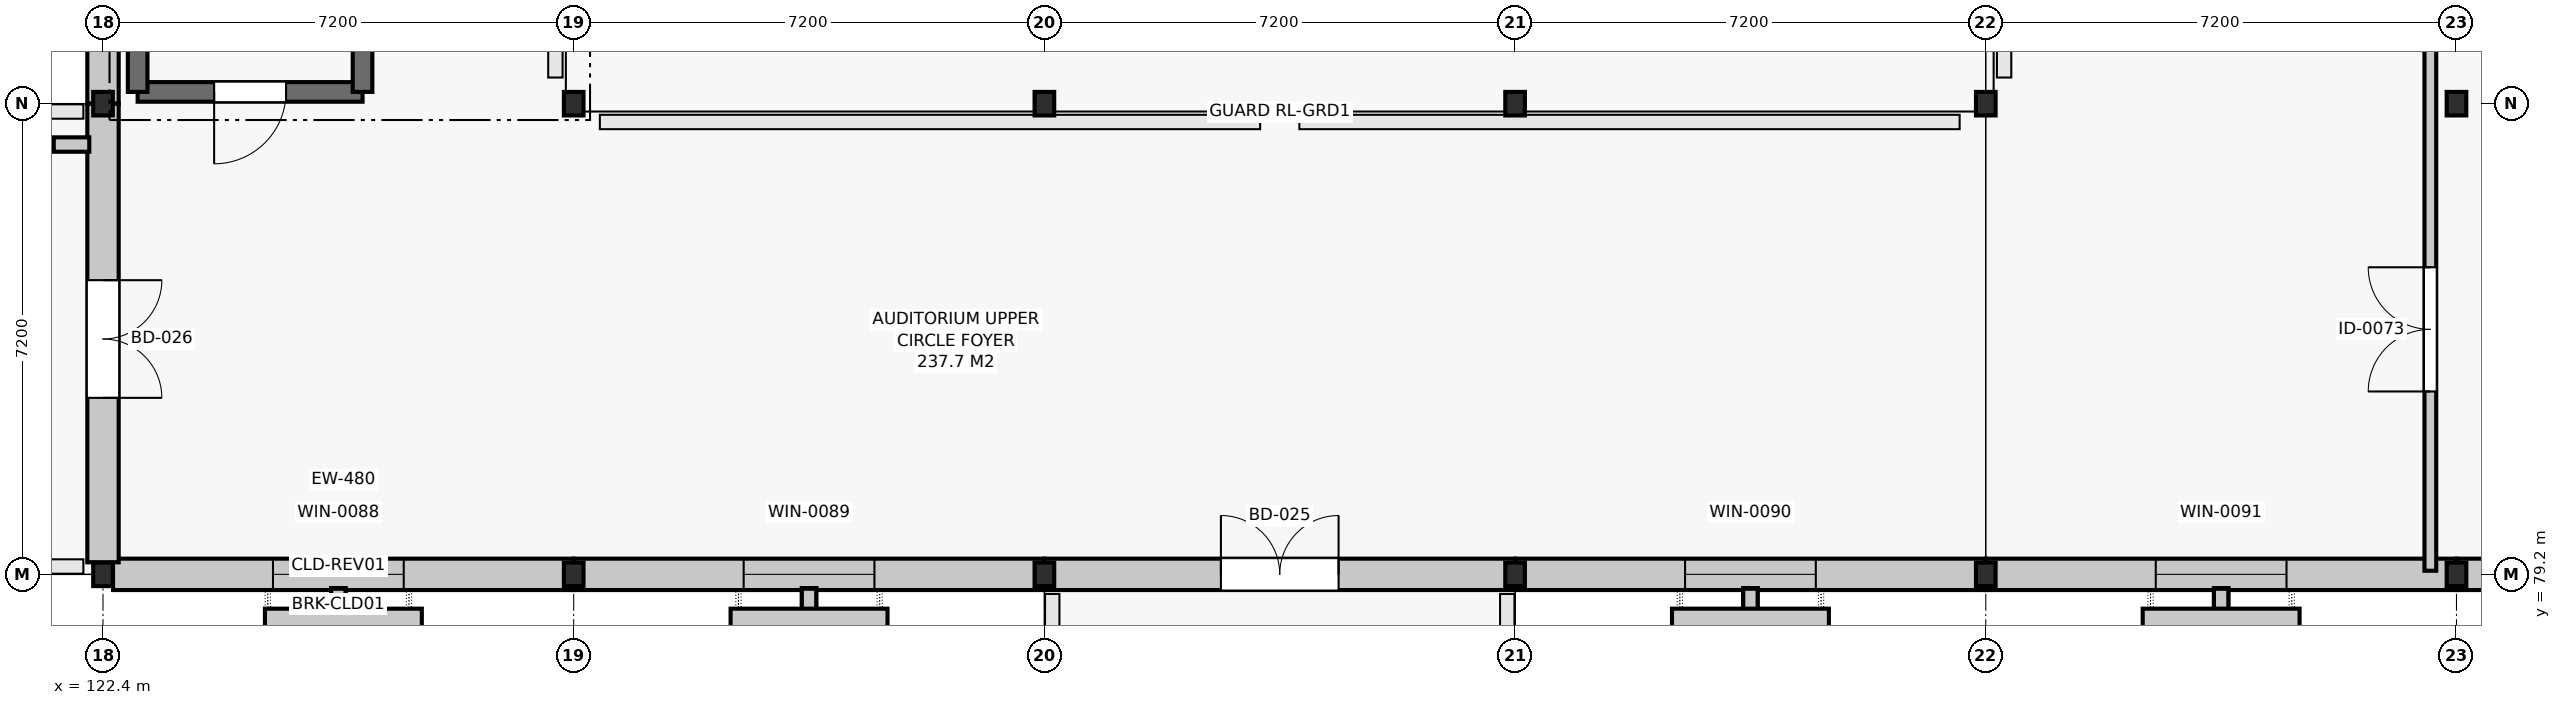
"""IFC4 building model, lengths in metres.
Left out: names, types, materials, properties, quantities, classifications, styles, units other than length and angle.
Written with IfcOpenShell. Run it as: python <this file> out.ifc"""

import sys

from ifc_helpers import new_model, si_unit, direction, frame, frame_2d, origin, origin_2d, place, context, subcontext, project, spatial, rectangle, i_section, extrude, element, fill, save


model = new_model("IFC4")
c1 = context("Model", 3, precision=1e-05, world=origin(), true_north=direction((0.0, 1.0)))
c2 = subcontext(c1, "Body", "Model", "MODEL_VIEW")
j1 = project(units=[si_unit("LENGTHUNIT", "METRE"), si_unit("PLANEANGLEUNIT", "RADIAN")], contexts=[c1])
p1 = place(None, origin())
s1 = spatial("IfcSite", under=j1, at=p1, CompositionType="ELEMENT")
p2 = place(p1, origin())
s2 = spatial("IfcBuilding", under=s1, at=p2, CompositionType="ELEMENT")
p3 = place(p2, frame((0.0, 0.0, 5.4)))
s3 = spatial("IfcBuildingStorey", under=s2, at=p3, CompositionType="ELEMENT", Elevation=5.4)
for number, where, z_axis, x_axis in (
    (1, (122.4, 79.2, 0.0), (0.0, 0.0, 1.0), (1.0, 0.0, 0.0)),
    (2, (122.4, 86.4, 0.0), (0.0, 0.0, 1.0), (1.0, 0.0, 0.0)),
    (3, (129.6, 79.2, 0.0), (0.0, 0.0, 1.0), (1.0, 0.0, 0.0)),
    (4, (129.6, 86.4, 0.0), (0.0, 0.0, 1.0), (1.0, 0.0, 0.0)),
    (5, (136.8, 79.2, 0.0), (0.0, 0.0, 1.0), (1.0, 0.0, 0.0)),
    (6, (136.8, 86.4, 0.0), (0.0, 0.0, 1.0), (1.0, 0.0, 0.0)),
    (7, (144.0, 79.2, 0.0), (0.0, 0.0, 1.0), (1.0, 0.0, 0.0)),
    (8, (144.0, 86.4, 0.0), (0.0, 0.0, 1.0), (1.0, 0.0, 0.0)),
    (9, (151.2, 79.2, 0.0), (0.0, 0.0, 1.0), (1.0, 0.0, 0.0)),
    (10, (151.2, 86.4, 0.0), (0.0, 0.0, 1.0), (1.0, 0.0, 0.0)),
    (11, (158.4, 79.2, 0.0), (0.0, 0.0, 1.0), (1.0, 0.0, 0.0)),
    (12, (158.4, 86.4, 0.0), (0.0, 0.0, 1.0), (1.0, 0.0, 0.0)),
):
    element("IfcColumn", number, at=place(p3, frame(where, z_axis=z_axis, x_axis=x_axis)), inside=s3, PredefinedType="COLUMN", context=c2, shape_type="SweptSolid", body=[
        extrude(i_section(OverallWidth=0.3, OverallDepth=0.36, WebThickness=0.012, FlangeThickness=0.022, FilletRadius=0.027, at=origin_2d()), origin(), (0.0, 0.0, 1.0), 4.8),
    ])
p4 = place(p3, frame((122.554, 79.2, 0.0), z_axis=(0.0, 0.0, 1.0), x_axis=(1.0, 0.0, 0.0)))
e13 = element("IfcWall", 13, at=p4, inside=s3, PredefinedType="SOLIDWALL", context=c2, shape_type="SweptSolid", body=[
    extrude(rectangle(XDim=7.046, YDim=0.48, at=frame_2d((3.523, 0.0))), origin(), (0.0, 0.0, 1.0), 3.8),
])
p5 = place(p4, frame((2.446, 0.0, 1.35)))
e14 = element("IfcOpeningElement", 14, at=p5, cuts=e13, PredefinedType="OPENING", context=c2, shape_type="SweptSolid", body=[
    extrude(rectangle(XDim=2.0, YDim=1.5, at=frame_2d((1.0, 0.75))), frame((0.0, 0.252, 0.0), z_axis=(0.0, -1.0, 0.0), x_axis=(1.0, 0.0, 0.0)), (0.0, 0.0, 1.0), 0.504),
])
p6 = place(p3, frame((129.6, 79.2, 0.0), z_axis=(0.0, 0.0, 1.0), x_axis=(1.0, 0.0, 0.0)))
e15 = element("IfcWall", 15, at=p6, inside=s3, PredefinedType="SOLIDWALL", context=c2, shape_type="SweptSolid", body=[
    extrude(rectangle(XDim=7.2, YDim=0.48, at=frame_2d((3.6, 0.0))), origin(), (0.0, 0.0, 1.0), 3.8),
])
p7 = place(p6, frame((2.6, 0.0, 1.35)))
e16 = element("IfcOpeningElement", 16, at=p7, cuts=e15, PredefinedType="OPENING", context=c2, shape_type="SweptSolid", body=[
    extrude(rectangle(XDim=2.0, YDim=1.5, at=frame_2d((1.0, 0.75))), frame((0.0, 0.252, 0.0), z_axis=(0.0, -1.0, 0.0), x_axis=(1.0, 0.0, 0.0)), (0.0, 0.0, 1.0), 0.504),
])
p8 = place(p3, frame((136.8, 79.2, 0.0), z_axis=(0.0, 0.0, 1.0), x_axis=(1.0, 0.0, 0.0)))
e17 = element("IfcWall", 17, at=p8, inside=s3, PredefinedType="SOLIDWALL", context=c2, shape_type="SweptSolid", body=[
    extrude(rectangle(XDim=7.2, YDim=0.48, at=frame_2d((3.6, 0.0))), origin(), (0.0, 0.0, 1.0), 3.8),
])
p9 = place(p8, frame((2.7, 0.0, 0.0)))
e18 = element("IfcOpeningElement", 18, at=p9, cuts=e17, PredefinedType="OPENING", context=c2, shape_type="SweptSolid", body=[
    extrude(rectangle(XDim=1.8, YDim=2.3, at=frame_2d((0.9, 1.15))), frame((0.0, 0.252, 0.0), z_axis=(0.0, -1.0, 0.0), x_axis=(1.0, 0.0, 0.0)), (0.0, 0.0, 1.0), 0.504),
])
p10 = place(p3, frame((144.0, 79.2, 0.0), z_axis=(0.0, 0.0, 1.0), x_axis=(1.0, 0.0, 0.0)))
e19 = element("IfcWall", 19, at=p10, inside=s3, PredefinedType="SOLIDWALL", context=c2, shape_type="SweptSolid", body=[
    extrude(rectangle(XDim=7.2, YDim=0.48, at=frame_2d((3.6, 0.0))), origin(), (0.0, 0.0, 1.0), 3.8),
])
p11 = place(p10, frame((2.6, 0.0, 1.35)))
e20 = element("IfcOpeningElement", 20, at=p11, cuts=e19, PredefinedType="OPENING", context=c2, shape_type="SweptSolid", body=[
    extrude(rectangle(XDim=2.0, YDim=1.5, at=frame_2d((1.0, 0.75))), frame((0.0, 0.252, 0.0), z_axis=(0.0, -1.0, 0.0), x_axis=(1.0, 0.0, 0.0)), (0.0, 0.0, 1.0), 0.504),
])
p12 = place(p3, frame((151.2, 79.2, 0.0), z_axis=(0.0, 0.0, 1.0), x_axis=(1.0, 0.0, 0.0)))
e21 = element("IfcWall", 21, at=p12, inside=s3, PredefinedType="SOLIDWALL", context=c2, shape_type="SweptSolid", body=[
    extrude(rectangle(XDim=7.2, YDim=0.48, at=frame_2d((3.6, 0.0))), origin(), (0.0, 0.0, 1.0), 3.8),
])
p13 = place(p12, frame((2.6, 0.0, 1.35)))
e22 = element("IfcOpeningElement", 22, at=p13, cuts=e21, PredefinedType="OPENING", context=c2, shape_type="SweptSolid", body=[
    extrude(rectangle(XDim=2.0, YDim=1.5, at=frame_2d((1.0, 0.75))), frame((0.0, 0.252, 0.0), z_axis=(0.0, -1.0, 0.0), x_axis=(1.0, 0.0, 0.0)), (0.0, 0.0, 1.0), 0.504),
])
p14 = place(p3, frame((158.4, 79.2, 0.0), z_axis=(0.0, 0.0, 1.0), x_axis=(1.0, 0.0, 0.0)))
e23 = element("IfcWall", 23, at=p14, inside=s3, PredefinedType="SOLIDWALL", context=c2, shape_type="SweptSolid", body=[
    extrude(rectangle(XDim=7.046, YDim=0.48, at=frame_2d((3.523, 0.0))), origin(), (0.0, 0.0, 1.0), 3.8),
])
p15 = place(p14, frame((2.6, 0.0, 1.35)))
e24 = element("IfcOpeningElement", 24, at=p15, cuts=e23, PredefinedType="OPENING", context=c2, shape_type="SweptSolid", body=[
    extrude(rectangle(XDim=2.0, YDim=1.5, at=frame_2d((1.0, 0.75))), frame((0.0, 0.252, 0.0), z_axis=(0.0, -1.0, 0.0), x_axis=(1.0, 0.0, 0.0)), (0.0, 0.0, 1.0), 0.504),
])
p16 = place(p3, frame((122.4, 93.6, 0.0), z_axis=(0.0, 0.0, 1.0), x_axis=(0.0, -1.0, 0.0)))
e25 = element("IfcWall", 25, at=p16, inside=s3, PredefinedType="SOLIDWALL", context=c2, shape_type="SweptSolid", body=[
    extrude(rectangle(XDim=7.2, YDim=0.48, at=frame_2d((3.6, 0.0))), origin(), (0.0, 0.0, 1.0), 3.8),
])
p17 = place(p16, frame((2.6, 0.0, 1.35)))
e26 = element("IfcOpeningElement", 26, at=p17, cuts=e25, PredefinedType="OPENING", context=c2, shape_type="SweptSolid", body=[
    extrude(rectangle(XDim=2.0, YDim=1.5, at=frame_2d((1.0, 0.75))), frame((0.0, 0.252, 0.0), z_axis=(0.0, -1.0, 0.0), x_axis=(1.0, 0.0, 0.0)), (0.0, 0.0, 1.0), 0.504),
])
p18 = place(p3, frame((122.4, 86.4, 0.0), z_axis=(0.0, 0.0, 1.0), x_axis=(0.0, -1.0, 0.0)))
e27 = element("IfcWall", 27, at=p18, inside=s3, PredefinedType="SOLIDWALL", context=c2, shape_type="SweptSolid", body=[
    extrude(rectangle(XDim=7.016, YDim=0.48, at=frame_2d((3.508, 0.0))), origin(), (0.0, 0.0, 1.0), 3.8),
])
p19 = place(p18, frame((2.7, 0.0, 0.0)))
e28 = element("IfcOpeningElement", 28, at=p19, cuts=e27, PredefinedType="OPENING", context=c2, shape_type="SweptSolid", body=[
    extrude(rectangle(XDim=1.8, YDim=2.3, at=frame_2d((0.9, 1.15))), frame((0.0, 0.252, 0.0), z_axis=(0.0, -1.0, 0.0), x_axis=(1.0, 0.0, 0.0)), (0.0, 0.0, 1.0), 0.504),
])
p20 = place(p3, frame((122.93, 86.58, 0.0), z_axis=(0.0, 0.0, 1.0), x_axis=(1.0, 0.0, 0.0)))
e29 = element("IfcWall", 29, at=p20, inside=s3, PredefinedType="SHEAR", context=c2, shape_type="SweptSolid", body=[
    extrude(rectangle(XDim=3.44, YDim=0.3, at=frame_2d((1.72, 0.0))), origin(), (0.0, 0.0, 1.0), 4.52),
])
p21 = place(p20, frame((1.17, 0.0, 0.0)))
e30 = element("IfcOpeningElement", 30, at=p21, cuts=e29, PredefinedType="OPENING", context=c2, shape_type="SweptSolid", body=[
    extrude(rectangle(XDim=1.1, YDim=2.15, at=frame_2d((0.55, 1.075))), frame((0.0, 0.162, 0.0), z_axis=(0.0, -1.0, 0.0), x_axis=(1.0, 0.0, 0.0)), (0.0, 0.0, 1.0), 0.324),
])
for number, where, z_axis, x_axis in (
    (31, (126.37, 86.58, 0.0), (0.0, 0.0, 1.0), (0.0, 1.0, 0.0)),
    (32, (122.93, 93.52, 0.0), (0.0, 0.0, 1.0), (0.0, -1.0, 0.0)),
):
    element("IfcWall", number, at=place(p3, frame(where, z_axis=z_axis, x_axis=x_axis)), inside=s3, PredefinedType="SHEAR", context=c2, shape_type="SweptSolid", body=[
        extrude(rectangle(XDim=6.94, YDim=0.3, at=frame_2d((3.47, 0.0))), origin(), (0.0, 0.0, 1.0), 4.52),
    ])
p22 = place(p3, frame((158.0, 79.255, 0.0), z_axis=(0.0, 0.0, 1.0), x_axis=(0.0, 1.0, 0.0)))
e33 = element("IfcWall", 33, at=p22, inside=s3, PredefinedType="PARTITIONING", context=c2, shape_type="SweptSolid", body=[
    extrude(rectangle(XDim=19.653, YDim=0.18, at=frame_2d((9.827, 0.0))), origin(), (0.0, 0.0, 1.0), 3.955),
])
p23 = place(p22, frame((10.857, 0.0, 0.0)))
e34 = element("IfcOpeningElement", 34, at=p23, cuts=e33, PredefinedType="OPENING", context=c2, shape_type="SweptSolid", body=[
    extrude(rectangle(XDim=1.9, YDim=2.35, at=frame_2d((0.95, 1.175))), frame((0.0, 0.102, 0.0), z_axis=(0.0, -1.0, 0.0), x_axis=(1.0, 0.0, 0.0)), (0.0, 0.0, 1.0), 0.204),
])
p24 = place(p22, frame((2.742, 0.0, 0.0)))
e35 = element("IfcOpeningElement", 35, at=p24, cuts=e33, PredefinedType="OPENING", context=c2, shape_type="SweptSolid", body=[
    extrude(rectangle(XDim=1.9, YDim=2.35, at=frame_2d((0.95, 1.175))), frame((0.0, 0.102, 0.0), z_axis=(0.0, -1.0, 0.0), x_axis=(1.0, 0.0, 0.0)), (0.0, 0.0, 1.0), 0.204),
])
p25 = place(p5, origin())
e36 = element("IfcWindow", 36, at=p25, inside=s3, PartitioningType="SINGLE_PANEL", PredefinedType="WINDOW", context=c2, shape_type="SweptSolid", body=[
    extrude(rectangle(XDim=2.0, YDim=1.5, at=frame_2d((1.0, 0.75))), frame((0.0, 0.03, 0.0), z_axis=(0.0, -1.0, 0.0), x_axis=(1.0, 0.0, 0.0)), (0.0, 0.0, 1.0), 0.06),
])
fill(e14, e36)
p26 = place(p7, origin())
e37 = element("IfcWindow", 37, at=p26, inside=s3, PartitioningType="SINGLE_PANEL", PredefinedType="WINDOW", context=c2, shape_type="SweptSolid", body=[
    extrude(rectangle(XDim=2.0, YDim=1.5, at=frame_2d((1.0, 0.75))), frame((0.0, 0.03, 0.0), z_axis=(0.0, -1.0, 0.0), x_axis=(1.0, 0.0, 0.0)), (0.0, 0.0, 1.0), 0.06),
])
fill(e16, e37)
p27 = place(p9, origin())
e38 = element("IfcDoor", 38, at=p27, inside=s3, OperationType="DOUBLE_DOOR_SINGLE_SWING", PredefinedType="DOOR", context=c2, shape_type="SweptSolid", body=[
    extrude(rectangle(XDim=1.8, YDim=2.3, at=frame_2d((0.9, 1.15))), frame((0.0, 0.025, 0.0), z_axis=(0.0, -1.0, 0.0), x_axis=(1.0, 0.0, 0.0)), (0.0, 0.0, 1.0), 0.05),
])
fill(e18, e38)
p28 = place(p11, origin())
e39 = element("IfcWindow", 39, at=p28, inside=s3, PartitioningType="SINGLE_PANEL", PredefinedType="WINDOW", context=c2, shape_type="SweptSolid", body=[
    extrude(rectangle(XDim=2.0, YDim=1.5, at=frame_2d((1.0, 0.75))), frame((0.0, 0.03, 0.0), z_axis=(0.0, -1.0, 0.0), x_axis=(1.0, 0.0, 0.0)), (0.0, 0.0, 1.0), 0.06),
])
fill(e20, e39)
p29 = place(p13, origin())
e40 = element("IfcWindow", 40, at=p29, inside=s3, PartitioningType="SINGLE_PANEL", PredefinedType="WINDOW", context=c2, shape_type="SweptSolid", body=[
    extrude(rectangle(XDim=2.0, YDim=1.5, at=frame_2d((1.0, 0.75))), frame((0.0, 0.03, 0.0), z_axis=(0.0, -1.0, 0.0), x_axis=(1.0, 0.0, 0.0)), (0.0, 0.0, 1.0), 0.06),
])
fill(e22, e40)
p30 = place(p19, origin())
e41 = element("IfcDoor", 41, at=p30, inside=s3, OperationType="DOUBLE_DOOR_SINGLE_SWING", PredefinedType="DOOR", context=c2, shape_type="SweptSolid", body=[
    extrude(rectangle(XDim=1.8, YDim=2.3, at=frame_2d((0.9, 1.15))), frame((0.0, 0.025, 0.0), z_axis=(0.0, -1.0, 0.0), x_axis=(1.0, 0.0, 0.0)), (0.0, 0.0, 1.0), 0.05),
])
fill(e28, e41)
p31 = place(p21, frame((1.1, 0.0, 0.0), z_axis=(0.0, 0.0, 1.0), x_axis=(-1.0, 0.0, 0.0)))
e42 = element("IfcDoor", 42, at=p31, inside=s3, OperationType="SINGLE_SWING_RIGHT", PredefinedType="DOOR", context=c2, shape_type="SweptSolid", body=[
    extrude(rectangle(XDim=1.1, YDim=2.15, at=frame_2d((0.55, 1.075))), frame((0.0, 0.025, 0.0), z_axis=(0.0, -1.0, 0.0), x_axis=(1.0, 0.0, 0.0)), (0.0, 0.0, 1.0), 0.05),
])
fill(e30, e42)
p32 = place(p24, origin())
e43 = element("IfcDoor", 43, at=p32, inside=s3, OperationType="DOUBLE_DOOR_SINGLE_SWING", PredefinedType="DOOR", context=c2, shape_type="SweptSolid", body=[
    extrude(rectangle(XDim=1.9, YDim=2.35, at=frame_2d((0.95, 1.175))), frame((0.0, 0.025, 0.0), z_axis=(0.0, -1.0, 0.0), x_axis=(1.0, 0.0, 0.0)), (0.0, 0.0, 1.0), 0.05),
])
fill(e35, e43)
save(model, sys.argv[1])
